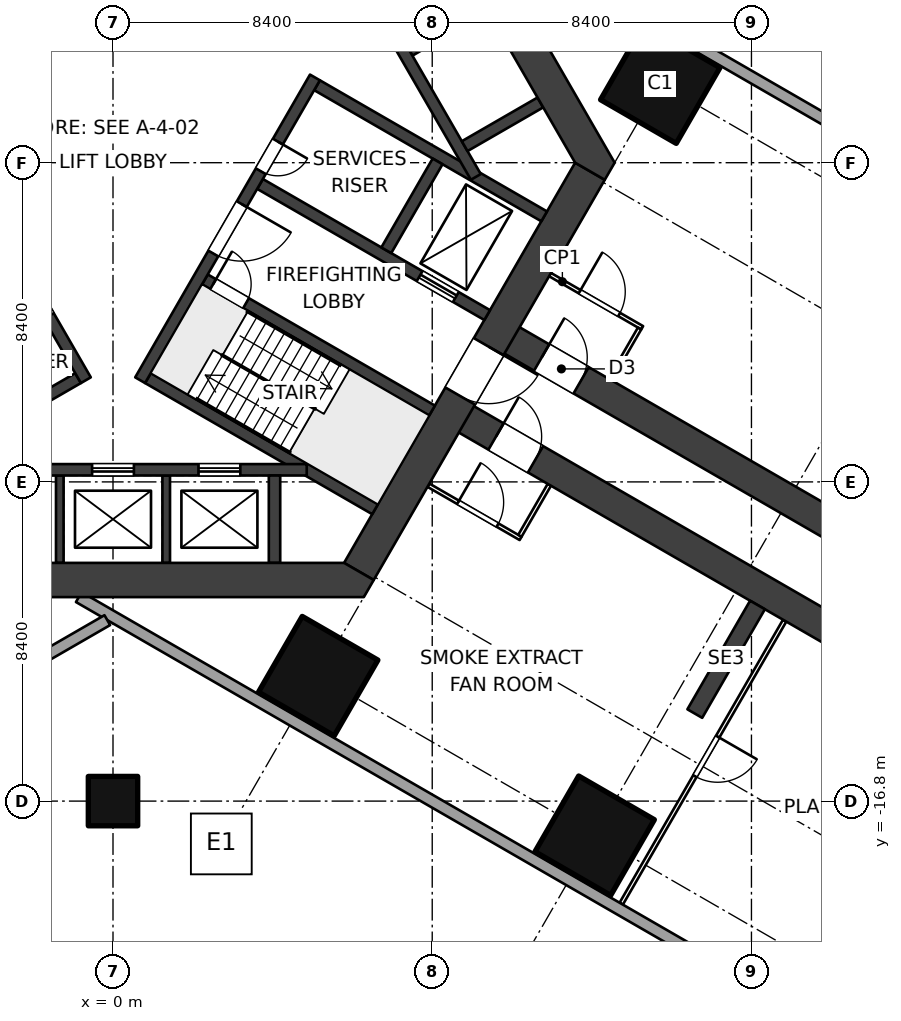
"""IFC4 building model, lengths in metres.
Left out: names, types, materials, properties, quantities, classifications, styles, units other than length and angle.
Written with IfcOpenShell. Run it as: python <this file> out.ifc"""

import sys

from ifc_helpers import new_model, si_unit, direction, frame, frame_2d, origin, origin_2d, place, context, subcontext, project, spatial, polyline, rectangle, outline, extrude, element, fill, save


model = new_model("IFC4")
c1 = context("Model", 3, precision=1e-05, world=origin(), true_north=direction((0.0, 1.0)))
c2 = subcontext(c1, "Body", "Model", "MODEL_VIEW")
j1 = project(units=[si_unit("LENGTHUNIT", "METRE"), si_unit("PLANEANGLEUNIT", "RADIAN")], contexts=[c1])
p1 = place(None, origin())
s1 = spatial("IfcSite", under=j1, at=p1, CompositionType="ELEMENT")
p2 = place(p1, origin())
s2 = spatial("IfcBuilding", under=s1, at=p2, CompositionType="ELEMENT")
p3 = place(p2, frame((0.0, 0.0, -3.5)))
s3 = spatial("IfcBuildingStorey", under=s2, at=p3, CompositionType="ELEMENT", Elevation=-3.5)
for number, where, z_axis, x_axis in (
    (1, (14.4, 2.078, 0.0), (0.0, 0.0, 1.0), (-0.5, -0.866, 0.0)),
    (2, (5.4, -13.51, 0.0), (0.0, 0.0, 1.0), (-0.5, -0.866, 0.0)),
    (3, (12.675, -17.71, 0.0), (0.0, 0.0, 1.0), (-0.5, -0.866, 0.0)),
    (4, (19.949, -21.91, 0.0), (0.0, 0.0, 1.0), (-0.5, -0.866, 0.0)),
):
    element("IfcColumn", number, at=place(p3, frame(where, z_axis=z_axis, x_axis=x_axis)), inside=s3, PredefinedType="COLUMN", context=c2, shape_type="SweptSolid", body=[
        extrude(rectangle(XDim=2.3, YDim=2.3, at=origin_2d()), origin(), (0.0, 0.0, 1.0), 3.5),
    ])
p4 = place(p3, frame((0.0, -16.8, 0.0), z_axis=(0.0, 0.0, 1.0), x_axis=(1.0, 0.0, 0.0)))
e5 = element("IfcColumn", 5, at=p4, inside=s3, PredefinedType="COLUMN", context=c2, shape_type="SweptSolid", body=[
    extrude(rectangle(XDim=1.3, YDim=1.3, at=origin_2d()), origin(), (0.0, 0.0, 1.0), 3.5),
])
p5 = place(p3, frame((12.551, -0.225, 0.0), z_axis=(0.0, 0.0, 1.0), x_axis=(-0.499997612506, -0.8660267822, 0.0)))
e6 = element("IfcWall", 6, at=p5, inside=s3, PredefinedType="SHEAR", context=c2, shape_type="SweptSolid", body=[
    extrude(rectangle(XDim=12.161, YDim=0.9, at=frame_2d((6.08, 0.0))), origin(), (0.0, 0.0, 1.0), 3.5),
])
p6 = place(p5, frame((5.33, 0.0, 0.0)))
e7 = element("IfcOpeningElement", 7, at=p6, cuts=e6, PredefinedType="OPENING", context=c2, shape_type="SweptSolid", body=[
    extrude(rectangle(XDim=1.5, YDim=2.1, at=frame_2d((0.75, 1.05))), frame((0.0, 0.46, 0.0), z_axis=(0.0, -1.0, 0.0), x_axis=(1.0, 0.0, 0.0)), (0.0, 0.0, 1.0), 0.92),
])
p7 = place(p3, origin())
e8 = element("IfcWall", 8, at=p7, inside=s3, PredefinedType="SHEAR", context=c2, shape_type="SweptSolid", body=[
    extrude(outline(polyline([(-6.6, -11.432), (6.6, -11.432), (6.86, -10.981), (6.08, -10.531), (-6.08, -10.531), (-6.86, -10.981), (-6.6, -11.432)])), origin(), (0.0, 0.0, 1.0), 3.5),
])
p8 = place(p3, origin())
e9 = element("IfcWall", 9, at=p8, inside=s3, PredefinedType="SHEAR", context=c2, shape_type="SweptSolid", body=[
    extrude(outline(polyline([(13.2, 0.0), (6.6, 11.432), (6.08, 11.432), (6.08, 10.531), (12.161, 0.0), (12.94, -0.45), (13.2, 0.0)])), origin(), (0.0, 0.0, 1.0), 3.5),
])
p9 = place(p3, frame((-0.714, -5.724, 0.0), z_axis=(0.0, 0.0, 1.0), x_axis=(-0.499995050369, 0.866028261437, 0.0)))
e10 = element("IfcWall", 10, at=p9, inside=s3, PredefinedType="SHEAR", context=c2, shape_type="SweptSolid", body=[
    extrude(rectangle(XDim=9.2, YDim=0.3, at=frame_2d((4.6, 0.0))), origin(), (0.0, 0.0, 1.0), 3.5),
])
p10 = place(p9, frame((3.85, 0.0, 0.0)))
e11 = element("IfcOpeningElement", 11, at=p10, cuts=e10, PredefinedType="OPENING", context=c2, shape_type="SweptSolid", body=[
    extrude(rectangle(XDim=1.5, YDim=2.1, at=frame_2d((0.75, 1.05))), frame((0.0, 0.16, 0.0), z_axis=(0.0, -1.0, 0.0), x_axis=(1.0, 0.0, 0.0)), (0.0, 0.0, 1.0), 0.32),
])
p11 = place(p9, frame((1.95, 0.0, 0.0)))
e12 = element("IfcOpeningElement", 12, at=p11, cuts=e10, PredefinedType="OPENING", context=c2, shape_type="SweptSolid", body=[
    extrude(rectangle(XDim=0.9, YDim=2.1, at=frame_2d((0.45, 1.05))), frame((0.0, 0.16, 0.0), z_axis=(0.0, -1.0, 0.0), x_axis=(1.0, 0.0, 0.0)), (0.0, 0.0, 1.0), 0.32),
])
p12 = place(p3, frame((-0.919, -5.669, 0.0), z_axis=(0.0, 0.0, 1.0), x_axis=(-0.866011800373, -0.500023561059, 0.0)))
e13 = element("IfcWall", 13, at=p12, inside=s3, PredefinedType="SHEAR", context=c2, shape_type="SweptSolid", body=[
    extrude(rectangle(XDim=6.902, YDim=0.3, at=frame_2d((3.451, 0.0))), origin(), (0.0, 0.0, 1.0), 3.5),
])
p13 = place(p3, frame((5.314, 2.244, 0.0), z_axis=(0.0, 0.0, 1.0), x_axis=(-0.499995050369, -0.866028261437, 0.0)))
e14 = element("IfcWall", 14, at=p13, inside=s3, PredefinedType="SHEAR", context=c2, shape_type="SweptSolid", body=[
    extrude(rectangle(XDim=9.2, YDim=0.3, at=frame_2d((4.6, 0.0))), origin(), (0.0, 0.0, 1.0), 3.5),
])
p14 = place(p13, frame((3.85, 0.0, 0.0)))
e15 = element("IfcOpeningElement", 15, at=p14, cuts=e14, PredefinedType="OPENING", context=c2, shape_type="SweptSolid", body=[
    extrude(rectangle(XDim=1.5, YDim=2.1, at=frame_2d((0.75, 1.05))), frame((0.0, 0.16, 0.0), z_axis=(0.0, -1.0, 0.0), x_axis=(1.0, 0.0, 0.0)), (0.0, 0.0, 1.0), 0.32),
])
p15 = place(p13, frame((1.95, 0.0, 0.0)))
e16 = element("IfcOpeningElement", 16, at=p15, cuts=e14, PredefinedType="OPENING", context=c2, shape_type="SweptSolid", body=[
    extrude(rectangle(XDim=0.9, YDim=2.1, at=frame_2d((0.45, 1.05))), frame((0.0, 0.16, 0.0), z_axis=(0.0, -1.0, 0.0), x_axis=(1.0, 0.0, 0.0)), (0.0, 0.0, 1.0), 0.32),
])
p16 = place(p3, frame((2.419, -3.071, 0.0), z_axis=(0.0, 0.0, 1.0), x_axis=(0.86602711848, -0.499997030048, 0.0)))
e17 = element("IfcWall", 17, at=p16, inside=s3, PredefinedType="SHEAR", context=c2, shape_type="SweptSolid", body=[
    extrude(rectangle(XDim=6.901, YDim=0.3, at=frame_2d((3.451, 0.0))), origin(), (0.0, 0.0, 1.0), 3.5),
])
p17 = place(p16, frame((0.25, 0.0, 0.0)))
e18 = element("IfcOpeningElement", 18, at=p17, cuts=e17, PredefinedType="OPENING", context=c2, shape_type="SweptSolid", body=[
    extrude(rectangle(XDim=1.0, YDim=2.1, at=frame_2d((0.5, 1.05))), frame((0.0, 0.16, 0.0), z_axis=(0.0, -1.0, 0.0), x_axis=(1.0, 0.0, 0.0)), (0.0, 0.0, 1.0), 0.32),
])
p18 = place(p3, frame((0.919, -5.669, 0.0), z_axis=(0.0, 0.0, 1.0), x_axis=(0.866011800373, -0.500023561059, 0.0)))
e19 = element("IfcWall", 19, at=p18, inside=s3, PredefinedType="SHEAR", context=c2, shape_type="SweptSolid", body=[
    extrude(rectangle(XDim=6.902, YDim=0.3, at=frame_2d((3.451, 0.0))), origin(), (0.0, 0.0, 1.0), 3.5),
])
p19 = place(p3, frame((3.869, -0.559, 0.0), z_axis=(0.0, 0.0, 1.0), x_axis=(0.86602711848, -0.499997030048, 0.0)))
e20 = element("IfcWall", 20, at=p19, inside=s3, PredefinedType="SHEAR", context=c2, shape_type="SweptSolid", body=[
    extrude(rectangle(XDim=6.901, YDim=0.3, at=frame_2d((3.451, 0.0))), origin(), (0.0, 0.0, 1.0), 3.5),
])
p20 = place(p19, frame((4.85, 0.0, 0.0)))
e21 = element("IfcOpeningElement", 21, at=p20, cuts=e20, PredefinedType="OPENING", context=c2, shape_type="SweptSolid", body=[
    extrude(rectangle(XDim=1.1, YDim=2.1, at=frame_2d((0.55, 1.05))), frame((0.0, 0.16, 0.0), z_axis=(0.0, -1.0, 0.0), x_axis=(1.0, 0.0, 0.0)), (0.0, 0.0, 1.0), 0.32),
])
p21 = place(p3, frame((5.369, 2.039, 0.0), z_axis=(0.0, 0.0, 1.0), x_axis=(0.86602711848, -0.499997030048, 0.0)))
e22 = element("IfcWall", 22, at=p21, inside=s3, PredefinedType="SHEAR", context=c2, shape_type="SweptSolid", body=[
    extrude(rectangle(XDim=6.901, YDim=0.3, at=frame_2d((3.451, 0.0))), origin(), (0.0, 0.0, 1.0), 3.5),
])
p22 = place(p3, frame((8.541, 0.034, 0.0), z_axis=(0.0, 0.0, 1.0), x_axis=(-0.50000943426, -0.866019956843, 0.0)))
e23 = element("IfcWall", 23, at=p22, inside=s3, PredefinedType="SHEAR", context=c2, shape_type="SweptSolid", body=[
    extrude(rectangle(XDim=2.7, YDim=0.3, at=frame_2d((1.35, 0.0))), origin(), (0.0, 0.0, 1.0), 3.5),
])
p23 = place(p3, frame((5.098, -8.082, 0.0), z_axis=(0.0, 0.0, 1.0), x_axis=(-1.0, 0.0, 0.0)))
e24 = element("IfcWall", 24, at=p23, inside=s3, PredefinedType="SHEAR", context=c2, shape_type="SweptSolid", body=[
    extrude(rectangle(XDim=10.195, YDim=0.3, at=frame_2d((5.098, 0.0))), origin(), (0.0, 0.0, 1.0), 3.5),
])
p24 = place(p23, frame((1.748, 0.0, 0.0)))
e25 = element("IfcOpeningElement", 25, at=p24, cuts=e24, PredefinedType="OPENING", context=c2, shape_type="SweptSolid", body=[
    extrude(rectangle(XDim=1.1, YDim=2.1, at=frame_2d((0.55, 1.05))), frame((0.0, 0.16, 0.0), z_axis=(0.0, -1.0, 0.0), x_axis=(1.0, 0.0, 0.0)), (0.0, 0.0, 1.0), 0.32),
])
p25 = place(p23, frame((4.548, 0.0, 0.0)))
e26 = element("IfcOpeningElement", 26, at=p25, cuts=e24, PredefinedType="OPENING", context=c2, shape_type="SweptSolid", body=[
    extrude(rectangle(XDim=1.1, YDim=2.1, at=frame_2d((0.55, 1.05))), frame((0.0, 0.16, 0.0), z_axis=(0.0, -1.0, 0.0), x_axis=(1.0, 0.0, 0.0)), (0.0, 0.0, 1.0), 0.32),
])
p26 = place(p23, frame((7.348, 0.0, 0.0)))
e27 = element("IfcOpeningElement", 27, at=p26, cuts=e24, PredefinedType="OPENING", context=c2, shape_type="SweptSolid", body=[
    extrude(rectangle(XDim=1.1, YDim=2.1, at=frame_2d((0.55, 1.05))), frame((0.0, 0.16, 0.0), z_axis=(0.0, -1.0, 0.0), x_axis=(1.0, 0.0, 0.0)), (0.0, 0.0, 1.0), 0.32),
])
p27 = place(p3, frame((4.25, -8.231, 0.0), z_axis=(0.0, 0.0, 1.0), x_axis=(0.0, -1.0, 0.0)))
e28 = element("IfcWall", 28, at=p27, inside=s3, PredefinedType="SHEAR", context=c2, shape_type="SweptSolid", body=[
    extrude(rectangle(XDim=2.3, YDim=0.3, at=frame_2d((1.15, 0.0))), origin(), (0.0, 0.0, 1.0), 3.5),
])
for number, where, z_axis, x_axis in (
    (29, (1.4, -8.231, 0.0), (0.0, 0.0, 1.0), (0.0, -1.0, 0.0)),
    (30, (-1.4, -8.231, 0.0), (0.0, 0.0, 1.0), (0.0, -1.0, 0.0)),
):
    element("IfcWall", number, at=place(p3, frame(where, z_axis=z_axis, x_axis=x_axis)), inside=s3, PredefinedType="SHEAR", context=c2, shape_type="SweptSolid", body=[
        extrude(rectangle(XDim=2.3, YDim=0.2, at=frame_2d((1.15, 0.0))), origin(), (0.0, 0.0, 1.0), 3.5),
    ])
p28 = place(p3, frame((4.45, 8.455, 0.0), z_axis=(0.0, 0.0, 1.0), x_axis=(0.500002290144, -0.866024081565, 0.0)))
e31 = element("IfcWall", 31, at=p28, inside=s3, PredefinedType="SHEAR", context=c2, shape_type="SweptSolid", body=[
    extrude(rectangle(XDim=10.195, YDim=0.3, at=frame_2d((5.098, 0.0))), origin(), (0.0, 0.0, 1.0), 3.5),
])
p29 = place(p3, frame((9.254, 0.435, 0.0), z_axis=(0.0, 0.0, 1.0), x_axis=(0.866007057882, 0.500031774688, 0.0)))
e32 = element("IfcWall", 32, at=p29, inside=s3, PredefinedType="SHEAR", context=c2, shape_type="SweptSolid", body=[
    extrude(rectangle(XDim=2.3, YDim=0.3, at=frame_2d((1.15, 0.0))), origin(), (0.0, 0.0, 1.0), 3.5),
])
p30 = place(p3, frame((7.829, 2.903, 0.0), z_axis=(0.0, 0.0, 1.0), x_axis=(0.866053019151, 0.499952165731, 0.0)))
e33 = element("IfcWall", 33, at=p30, inside=s3, PredefinedType="SHEAR", context=c2, shape_type="SweptSolid", body=[
    extrude(rectangle(XDim=2.3, YDim=0.2, at=frame_2d((1.15, 0.0))), origin(), (0.0, 0.0, 1.0), 3.5),
])
p31 = place(p3, frame((10.11, -4.451, 0.0), z_axis=(0.0, 0.0, 1.0), x_axis=(0.866025284237, -0.500000207062, 0.0)))
e34 = element("IfcWall", 34, at=p31, inside=s3, PredefinedType="SHEAR", context=c2, shape_type="SweptSolid", body=[
    extrude(rectangle(XDim=36.75, YDim=0.8, at=frame_2d((18.375, 0.0))), origin(), (0.0, 0.0, 1.0), 3.5),
])
p32 = place(p31, frame((1.35, 0.0, 0.0)))
e35 = element("IfcOpeningElement", 35, at=p32, cuts=e34, PredefinedType="OPENING", context=c2, shape_type="SweptSolid", body=[
    extrude(rectangle(XDim=1.2, YDim=2.1, at=frame_2d((0.6, 1.05))), frame((0.0, 0.41, 0.0), z_axis=(0.0, -1.0, 0.0), x_axis=(1.0, 0.0, 0.0)), (0.0, 0.0, 1.0), 0.82),
])
p33 = place(p3, frame((8.91, -6.53, 0.0), z_axis=(0.0, 0.0, 1.0), x_axis=(0.866025284237, -0.500000207062, 0.0)))
e36 = element("IfcWall", 36, at=p33, inside=s3, PredefinedType="SHEAR", context=c2, shape_type="SweptSolid", body=[
    extrude(rectangle(XDim=36.75, YDim=0.8, at=frame_2d((18.375, 0.0))), origin(), (0.0, 0.0, 1.0), 3.5),
])
p34 = place(p33, frame((1.35, 0.0, 0.0)))
e37 = element("IfcOpeningElement", 37, at=p34, cuts=e36, PredefinedType="OPENING", context=c2, shape_type="SweptSolid", body=[
    extrude(rectangle(XDim=1.2, YDim=2.1, at=frame_2d((0.6, 1.05))), frame((0.0, 0.41, 0.0), z_axis=(0.0, -1.0, 0.0), x_axis=(1.0, 0.0, 0.0)), (0.0, 0.0, 1.0), 0.82),
])
p35 = place(p3, frame((11.5, -2.945, 0.0), z_axis=(0.0, 0.0, 1.0), x_axis=(0.866034573852, -0.49998411664, 0.0)))
e38 = element("IfcWall", 38, at=p35, inside=s3, PredefinedType="PARTITIONING", context=c2, shape_type="SweptSolid", body=[
    extrude(rectangle(XDim=2.8, YDim=0.1, at=frame_2d((1.4, 0.0))), origin(), (0.0, 0.0, 1.0), 3.15),
])
p36 = place(p35, frame((0.9, 0.0, 0.0)))
e39 = element("IfcOpeningElement", 39, at=p36, cuts=e38, PredefinedType="OPENING", context=c2, shape_type="SweptSolid", body=[
    extrude(rectangle(XDim=1.2, YDim=2.1, at=frame_2d((0.6, 1.05))), frame((0.0, 0.06, 0.0), z_axis=(0.0, -1.0, 0.0), x_axis=(1.0, 0.0, 0.0)), (0.0, 0.0, 1.0), 0.12),
])
p37 = place(p3, frame((13.082, -5.705, 0.0), z_axis=(0.0, 0.0, 1.0), x_axis=(0.500086022567, 0.865975732936, 0.0)))
e40 = element("IfcWall", 40, at=p37, inside=s3, PredefinedType="PARTITIONING", context=c2, shape_type="SweptSolid", body=[
    extrude(rectangle(XDim=1.55, YDim=0.1, at=frame_2d((0.775, 0.0))), origin(), (0.0, 0.0, 1.0), 3.15),
])
p38 = place(p3, frame((8.3, -8.487, 0.0), z_axis=(0.0, 0.0, 1.0), x_axis=(0.866034573852, -0.49998411664, 0.0)))
e41 = element("IfcWall", 41, at=p38, inside=s3, PredefinedType="PARTITIONING", context=c2, shape_type="SweptSolid", body=[
    extrude(rectangle(XDim=2.8, YDim=0.1, at=frame_2d((1.4, 0.0))), origin(), (0.0, 0.0, 1.0), 3.15),
])
p39 = place(p38, frame((0.9, 0.0, 0.0)))
e42 = element("IfcOpeningElement", 42, at=p39, cuts=e41, PredefinedType="OPENING", context=c2, shape_type="SweptSolid", body=[
    extrude(rectangle(XDim=1.2, YDim=2.1, at=frame_2d((0.6, 1.05))), frame((0.0, 0.06, 0.0), z_axis=(0.0, -1.0, 0.0), x_axis=(1.0, 0.0, 0.0)), (0.0, 0.0, 1.0), 0.12),
])
p40 = place(p3, frame((11.482, -8.476, 0.0), z_axis=(0.0, 0.0, 1.0), x_axis=(-0.500017819788, -0.86601511528, 0.0)))
e43 = element("IfcWall", 43, at=p40, inside=s3, PredefinedType="PARTITIONING", context=c2, shape_type="SweptSolid", body=[
    extrude(rectangle(XDim=1.55, YDim=0.1, at=frame_2d((0.775, 0.0))), origin(), (0.0, 0.0, 1.0), 3.15),
])
p41 = place(p3, frame((17.674, -12.052, 0.0), z_axis=(0.0, 0.0, 1.0), x_axis=(-0.500007509209, -0.866021068297, 0.0)))
e44 = element("IfcWall", 44, at=p41, inside=s3, PredefinedType="PARTITIONING", context=c2, shape_type="SweptSolid", body=[
    extrude(rectangle(XDim=8.6, YDim=0.1, at=frame_2d((4.3, 0.0))), origin(), (0.0, 0.0, 1.0), 3.15),
])
p42 = place(p41, frame((3.525, 0.0, 0.0)))
e45 = element("IfcOpeningElement", 45, at=p42, cuts=e44, PredefinedType="OPENING", context=c2, shape_type="SweptSolid", body=[
    extrude(rectangle(XDim=1.2, YDim=2.1, at=frame_2d((0.6, 1.05))), frame((0.0, 0.06, 0.0), z_axis=(0.0, -1.0, 0.0), x_axis=(1.0, 0.0, 0.0)), (0.0, 0.0, 1.0), 0.12),
])
p43 = place(p3, frame((-0.15, -12.038, 0.0), z_axis=(0.0, 0.0, 1.0), x_axis=(-0.866026292622, -0.499998460486, 0.0)))
e46 = element("IfcWall", 46, at=p43, inside=s3, PredefinedType="SOLIDWALL", context=c2, shape_type="SweptSolid", body=[
    extrude(rectangle(XDim=41.883, YDim=0.3, at=frame_2d((20.941, 0.0))), origin(), (0.0, 0.0, 1.0), 3.15),
])
p44 = place(p43, frame((25.383, 0.0, 0.0)))
e47 = element("IfcOpeningElement", 47, at=p44, cuts=e46, PredefinedType="OPENING", context=c2, shape_type="SweptSolid", body=[
    extrude(rectangle(XDim=1.8, YDim=2.4, at=frame_2d((0.9, 1.2))), frame((0.0, 0.16, 0.0), z_axis=(0.0, -1.0, 0.0), x_axis=(1.0, 0.0, 0.0)), (0.0, 0.0, 1.0), 0.32),
])
p45 = place(p3, frame((9.45, 6.495, 0.0), z_axis=(0.0, 0.0, 1.0), x_axis=(0.866025301493, -0.500000177174, 0.0)))
e48 = element("IfcWall", 48, at=p45, inside=s3, PredefinedType="SOLIDWALL", context=c2, shape_type="SweptSolid", body=[
    extrude(rectangle(XDim=43.095, YDim=0.3, at=frame_2d((21.548, 0.0))), origin(), (0.0, 0.0, 1.0), 3.15),
])
p46 = place(p45, frame((26.595, 0.0, 0.0)))
e49 = element("IfcOpeningElement", 49, at=p46, cuts=e48, PredefinedType="OPENING", context=c2, shape_type="SweptSolid", body=[
    extrude(rectangle(XDim=1.8, YDim=2.4, at=frame_2d((0.9, 1.2))), frame((0.0, 0.16, 0.0), z_axis=(0.0, -1.0, 0.0), x_axis=(1.0, 0.0, 0.0)), (0.0, 0.0, 1.0), 0.32),
])
p47 = place(p3, frame((-0.9, -11.432, 0.0), z_axis=(0.0, 0.0, 1.0), x_axis=(0.866025301493, -0.500000177174, 0.0)))
e50 = element("IfcWall", 50, at=p47, inside=s3, PredefinedType="SOLIDWALL", context=c2, shape_type="SweptSolid", body=[
    extrude(rectangle(XDim=43.095, YDim=0.3, at=frame_2d((21.548, 0.0))), origin(), (0.0, 0.0, 1.0), 3.15),
])
p48 = place(p47, frame((26.595, 0.0, 0.0)))
e51 = element("IfcOpeningElement", 51, at=p48, cuts=e50, PredefinedType="OPENING", context=c2, shape_type="SweptSolid", body=[
    extrude(rectangle(XDim=1.8, YDim=2.4, at=frame_2d((0.9, 1.2))), frame((0.0, 0.16, 0.0), z_axis=(0.0, -1.0, 0.0), x_axis=(1.0, 0.0, 0.0)), (0.0, 0.0, 1.0), 0.32),
])
p49 = place(p3, frame((16.959, -11.639, 0.0), z_axis=(0.0, 0.0, 1.0), x_axis=(-0.50002983664, -0.866008176907, 0.0)))
e52 = element("IfcWall", 52, at=p49, inside=s3, PredefinedType="SOLIDWALL", context=c2, shape_type="SweptSolid", body=[
    extrude(rectangle(XDim=3.3, YDim=0.45, at=frame_2d((1.65, 0.0))), origin(), (0.0, 0.0, 1.0), 3.5),
])
p50 = place(p24, origin())
e53 = element("IfcDoor", 53, at=p50, inside=s3, OperationType="DOUBLE_DOOR_SLIDING", PredefinedType="DOOR", context=c2, shape_type="SweptSolid", body=[
    extrude(rectangle(XDim=1.1, YDim=2.1, at=frame_2d((0.55, 1.05))), frame((0.0, 0.025, 0.0), z_axis=(0.0, -1.0, 0.0), x_axis=(1.0, 0.0, 0.0)), (0.0, 0.0, 1.0), 0.05),
])
fill(e25, e53)
p51 = place(p25, origin())
e54 = element("IfcDoor", 54, at=p51, inside=s3, OperationType="DOUBLE_DOOR_SLIDING", PredefinedType="DOOR", context=c2, shape_type="SweptSolid", body=[
    extrude(rectangle(XDim=1.1, YDim=2.1, at=frame_2d((0.55, 1.05))), frame((0.0, 0.025, 0.0), z_axis=(0.0, -1.0, 0.0), x_axis=(1.0, 0.0, 0.0)), (0.0, 0.0, 1.0), 0.05),
])
fill(e26, e54)
p52 = place(p20, origin())
e55 = element("IfcDoor", 55, at=p52, inside=s3, OperationType="DOUBLE_DOOR_SLIDING", PredefinedType="DOOR", context=c2, shape_type="SweptSolid", body=[
    extrude(rectangle(XDim=1.1, YDim=2.1, at=frame_2d((0.55, 1.05))), frame((0.0, 0.025, 0.0), z_axis=(0.0, -1.0, 0.0), x_axis=(1.0, 0.0, 0.0)), (0.0, 0.0, 1.0), 0.05),
])
fill(e21, e55)
p53 = place(p14, origin())
e56 = element("IfcDoor", 56, at=p53, inside=s3, OperationType="DOUBLE_DOOR_DOUBLE_SWING", PredefinedType="DOOR", context=c2, shape_type="SweptSolid", body=[
    extrude(rectangle(XDim=1.5, YDim=2.1, at=frame_2d((0.75, 1.05))), frame((0.0, 0.025, 0.0), z_axis=(0.0, -1.0, 0.0), x_axis=(1.0, 0.0, 0.0)), (0.0, 0.0, 1.0), 0.05),
])
fill(e15, e56)
p54 = place(p15, origin())
e57 = element("IfcDoor", 57, at=p54, inside=s3, OperationType="SINGLE_SWING_LEFT", PredefinedType="DOOR", context=c2, shape_type="SweptSolid", body=[
    extrude(rectangle(XDim=0.9, YDim=2.1, at=frame_2d((0.45, 1.05))), frame((0.0, 0.025, 0.0), z_axis=(0.0, -1.0, 0.0), x_axis=(1.0, 0.0, 0.0)), (0.0, 0.0, 1.0), 0.05),
])
fill(e16, e57)
p55 = place(p17, origin())
e58 = element("IfcDoor", 58, at=p55, inside=s3, OperationType="SINGLE_SWING_LEFT", PredefinedType="DOOR", context=c2, shape_type="SweptSolid", body=[
    extrude(rectangle(XDim=1.0, YDim=2.1, at=frame_2d((0.5, 1.05))), frame((0.0, 0.025, 0.0), z_axis=(0.0, -1.0, 0.0), x_axis=(1.0, 0.0, 0.0)), (0.0, 0.0, 1.0), 0.05),
])
fill(e18, e58)
p56 = place(p6, origin())
e59 = element("IfcDoor", 59, at=p56, inside=s3, OperationType="DOUBLE_DOOR_DOUBLE_SWING", PredefinedType="DOOR", context=c2, shape_type="SweptSolid", body=[
    extrude(rectangle(XDim=1.5, YDim=2.1, at=frame_2d((0.75, 1.05))), frame((0.0, 0.025, 0.0), z_axis=(0.0, -1.0, 0.0), x_axis=(1.0, 0.0, 0.0)), (0.0, 0.0, 1.0), 0.05),
])
fill(e7, e59)
p57 = place(p32, origin())
e60 = element("IfcDoor", 60, at=p57, inside=s3, OperationType="DOUBLE_SWING_LEFT", PredefinedType="DOOR", context=c2, shape_type="SweptSolid", body=[
    extrude(rectangle(XDim=1.2, YDim=2.1, at=frame_2d((0.6, 1.05))), frame((0.0, 0.025, 0.0), z_axis=(0.0, -1.0, 0.0), x_axis=(1.0, 0.0, 0.0)), (0.0, 0.0, 1.0), 0.05),
])
fill(e35, e60)
p58 = place(p36, origin())
e61 = element("IfcDoor", 61, at=p58, inside=s3, OperationType="DOUBLE_SWING_LEFT", PredefinedType="DOOR", context=c2, shape_type="SweptSolid", body=[
    extrude(rectangle(XDim=1.2, YDim=2.1, at=frame_2d((0.6, 1.05))), frame((0.0, 0.025, 0.0), z_axis=(0.0, -1.0, 0.0), x_axis=(1.0, 0.0, 0.0)), (0.0, 0.0, 1.0), 0.05),
])
fill(e39, e61)
p59 = place(p34, origin())
e62 = element("IfcDoor", 62, at=p59, inside=s3, OperationType="DOUBLE_SWING_LEFT", PredefinedType="DOOR", context=c2, shape_type="SweptSolid", body=[
    extrude(rectangle(XDim=1.2, YDim=2.1, at=frame_2d((0.6, 1.05))), frame((0.0, 0.025, 0.0), z_axis=(0.0, -1.0, 0.0), x_axis=(1.0, 0.0, 0.0)), (0.0, 0.0, 1.0), 0.05),
])
fill(e37, e62)
p60 = place(p42, origin())
e63 = element("IfcDoor", 63, at=p60, inside=s3, OperationType="DOUBLE_SWING_LEFT", PredefinedType="DOOR", context=c2, shape_type="SweptSolid", body=[
    extrude(rectangle(XDim=1.2, YDim=2.1, at=frame_2d((0.6, 1.05))), frame((0.0, 0.025, 0.0), z_axis=(0.0, -1.0, 0.0), x_axis=(1.0, 0.0, 0.0)), (0.0, 0.0, 1.0), 0.05),
])
fill(e45, e63)
p61 = place(p39, origin())
e64 = element("IfcDoor", 64, at=p61, inside=s3, OperationType="DOUBLE_SWING_LEFT", PredefinedType="DOOR", context=c2, shape_type="SweptSolid", body=[
    extrude(rectangle(XDim=1.2, YDim=2.1, at=frame_2d((0.6, 1.05))), frame((0.0, 0.025, 0.0), z_axis=(0.0, -1.0, 0.0), x_axis=(1.0, 0.0, 0.0)), (0.0, 0.0, 1.0), 0.05),
])
fill(e42, e64)
save(model, sys.argv[1])
